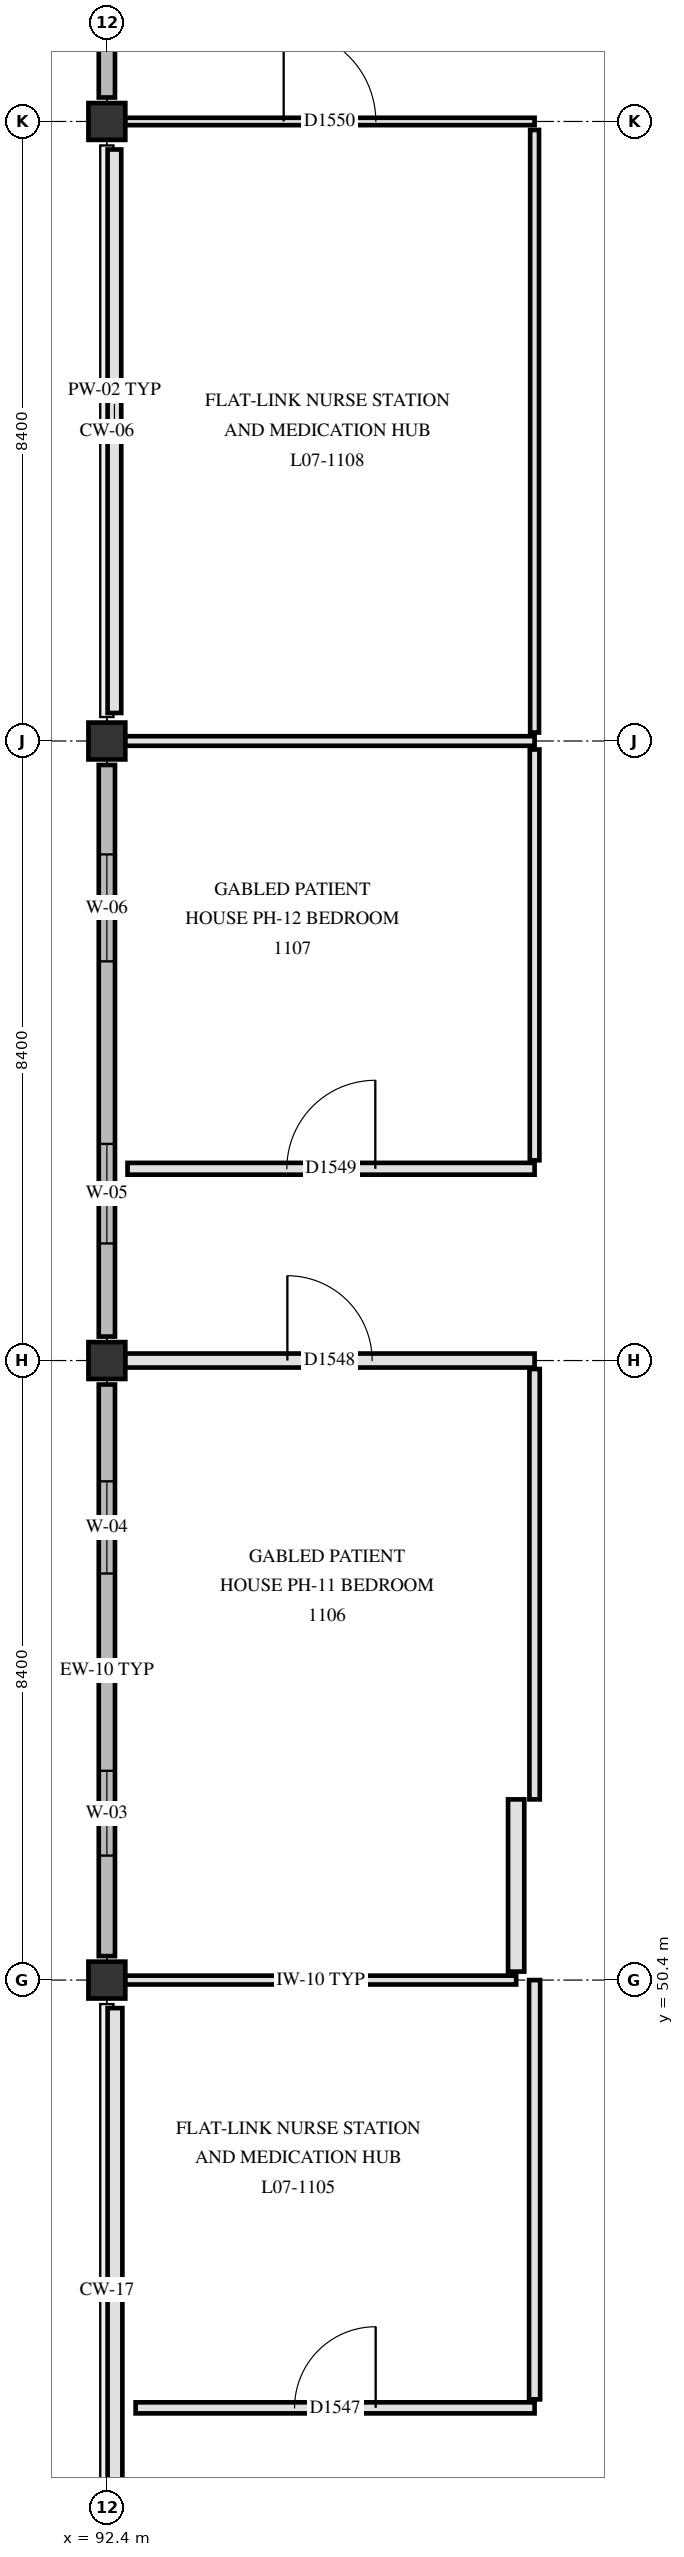
"""IFC4 building model, lengths in metres.
Left out: names, types, materials, properties, quantities, classifications, styles, units other than length and angle.
Written with IfcOpenShell. Run it as: python <this file> out.ifc"""

import sys

from ifc_helpers import new_model, si_unit, direction, frame, frame_2d, origin, origin_2d, place, context, subcontext, project, spatial, polyline, rectangle, outline, extrude, element, fill, save


model = new_model("IFC4")
c1 = context("Model", 3, precision=1e-05, world=origin(), true_north=direction((0.0, 1.0)))
c2 = subcontext(c1, "Body", "Model", "MODEL_VIEW")
j1 = project(units=[si_unit("LENGTHUNIT", "METRE"), si_unit("PLANEANGLEUNIT", "RADIAN")], contexts=[c1])
p1 = place(None, origin())
s1 = spatial("IfcSite", under=j1, at=p1, CompositionType="ELEMENT")
p2 = place(p1, origin())
s2 = spatial("IfcBuilding", under=s1, at=p2, CompositionType="ELEMENT")
p3 = place(p2, frame((0.0, 0.0, 30.3)))
s3 = spatial("IfcBuildingStorey", under=s2, at=p3, CompositionType="ELEMENT", Elevation=30.3)
for number, where, z_axis, x_axis in (
    (1, (92.4, 50.4, 0.0), (0.0, 0.0, 1.0), (1.0, 0.0, 0.0)),
    (2, (92.4, 58.8, 0.0), (0.0, 0.0, 1.0), (1.0, 0.0, 0.0)),
    (3, (92.4, 67.2, 0.0), (0.0, 0.0, 1.0), (1.0, 0.0, 0.0)),
    (4, (92.4, 75.6, 0.0), (0.0, 0.0, 1.0), (1.0, 0.0, 0.0)),
):
    element("IfcColumn", number, at=place(p3, frame(where, z_axis=z_axis, x_axis=x_axis)), inside=s3, PredefinedType="COLUMN", context=c2, shape_type="SweptSolid", body=[
        extrude(rectangle(XDim=0.5, YDim=0.5, at=origin_2d()), origin(), (0.0, 0.0, 1.0), 3.9),
    ])
p4 = place(p3, frame((92.4, 50.725, 0.0), z_axis=(0.0, 0.0, 1.0), x_axis=(0.0, 1.0, 0.0)))
e5 = element("IfcWall", 5, at=p4, inside=s3, PredefinedType="SOLIDWALL", context=c2, shape_type="SweptSolid", body=[
    extrude(outline(polyline([(0.0, 0.0), (7.75, 0.0), (7.75, 3.42), (3.875, 5.76), (0.0, 3.42), (0.0, 0.0)])), frame((0.0, 0.11, 0.0), z_axis=(0.0, -1.0, 0.0), x_axis=(1.0, 0.0, 0.0)), (0.0, 0.0, 1.0), 0.22),
])
p5 = place(p4, frame((1.363, 0.0, 0.85)))
e6 = element("IfcOpeningElement", 6, at=p5, cuts=e5, PredefinedType="OPENING", context=c2, shape_type="SweptSolid", body=[
    extrude(rectangle(XDim=1.15, YDim=1.3, at=frame_2d((0.575, 0.65))), frame((0.0, 0.12, 0.0), z_axis=(0.0, -1.0, 0.0), x_axis=(1.0, 0.0, 0.0)), (0.0, 0.0, 1.0), 0.24),
])
p6 = place(p4, frame((5.188, 0.0, 0.85)))
e7 = element("IfcOpeningElement", 7, at=p6, cuts=e5, PredefinedType="OPENING", context=c2, shape_type="SweptSolid", body=[
    extrude(rectangle(XDim=1.25, YDim=1.3, at=frame_2d((0.625, 0.65))), frame((0.0, 0.12, 0.0), z_axis=(0.0, -1.0, 0.0), x_axis=(1.0, 0.0, 0.0)), (0.0, 0.0, 1.0), 0.24),
])
p7 = place(p3, frame((92.4, 59.125, 0.0), z_axis=(0.0, 0.0, 1.0), x_axis=(0.0, 1.0, 0.0)))
e8 = element("IfcWall", 8, at=p7, inside=s3, PredefinedType="SOLIDWALL", context=c2, shape_type="SweptSolid", body=[
    extrude(outline(polyline([(0.0, 0.0), (7.75, 0.0), (7.75, 3.42), (3.875, 5.76), (0.0, 3.42), (0.0, 0.0)])), frame((0.0, 0.11, 0.0), z_axis=(0.0, -1.0, 0.0), x_axis=(1.0, 0.0, 0.0)), (0.0, 0.0, 1.0), 0.22),
])
p8 = place(p7, frame((1.262, 0.0, 0.85)))
e9 = element("IfcOpeningElement", 9, at=p8, cuts=e8, PredefinedType="OPENING", context=c2, shape_type="SweptSolid", body=[
    extrude(rectangle(XDim=1.35, YDim=1.3, at=frame_2d((0.675, 0.65))), frame((0.0, 0.12, 0.0), z_axis=(0.0, -1.0, 0.0), x_axis=(1.0, 0.0, 0.0)), (0.0, 0.0, 1.0), 0.24),
])
p9 = place(p7, frame((5.087, 0.0, 0.85)))
e10 = element("IfcOpeningElement", 10, at=p9, cuts=e8, PredefinedType="OPENING", context=c2, shape_type="SweptSolid", body=[
    extrude(rectangle(XDim=1.45, YDim=1.3, at=frame_2d((0.725, 0.65))), frame((0.0, 0.12, 0.0), z_axis=(0.0, -1.0, 0.0), x_axis=(1.0, 0.0, 0.0)), (0.0, 0.0, 1.0), 0.24),
])
p10 = place(p3, frame((92.4, 75.925, 0.0), z_axis=(0.0, 0.0, 1.0), x_axis=(0.0, 1.0, 0.0)))
e11 = element("IfcWall", 11, at=p10, inside=s3, PredefinedType="SOLIDWALL", context=c2, shape_type="SweptSolid", body=[
    extrude(outline(polyline([(0.0, 0.0), (7.75, 0.0), (7.75, 3.42), (3.875, 5.76), (0.0, 3.42), (0.0, 0.0)])), frame((0.0, 0.11, 0.0), z_axis=(0.0, -1.0, 0.0), x_axis=(1.0, 0.0, 0.0)), (0.0, 0.0, 1.0), 0.22),
])
p11 = place(p10, frame((1.163, 0.0, 0.85)))
e12 = element("IfcOpeningElement", 12, at=p11, cuts=e11, PredefinedType="OPENING", context=c2, shape_type="SweptSolid", body=[
    extrude(rectangle(XDim=1.55, YDim=1.3, at=frame_2d((0.775, 0.65))), frame((0.0, 0.12, 0.0), z_axis=(0.0, -1.0, 0.0), x_axis=(1.0, 0.0, 0.0)), (0.0, 0.0, 1.0), 0.24),
])
p12 = place(p10, frame((4.988, 0.0, 0.85)))
e13 = element("IfcOpeningElement", 13, at=p12, cuts=e11, PredefinedType="OPENING", context=c2, shape_type="SweptSolid", body=[
    extrude(rectangle(XDim=1.65, YDim=1.3, at=frame_2d((0.825, 0.65))), frame((0.0, 0.12, 0.0), z_axis=(0.0, -1.0, 0.0), x_axis=(1.0, 0.0, 0.0)), (0.0, 0.0, 1.0), 0.24),
])
p13 = place(p3, frame((92.502, 67.58, 3.88), z_axis=(0.0, 0.0, 1.0), x_axis=(0.0, 1.0, 0.0)))
e14 = element("IfcWall", 14, at=p13, inside=s3, PredefinedType="PARAPET", context=c2, shape_type="SweptSolid", body=[
    extrude(rectangle(XDim=7.64, YDim=0.185, at=frame_2d((3.82, 0.0))), origin(), (0.0, 0.0, 1.0), 0.47),
])
p14 = place(p3, frame((92.51, 42.38, 3.88), z_axis=(0.0, 0.0, 1.0), x_axis=(0.0, 1.0, 0.0)))
e15 = element("IfcWall", 15, at=p14, inside=s3, PredefinedType="PARAPET", context=c2, shape_type="SweptSolid", body=[
    extrude(rectangle(XDim=7.64, YDim=0.2, at=frame_2d((3.82, 0.0))), origin(), (0.0, 0.0, 1.0), 0.47),
])
p15 = place(p3, frame((92.79, 44.6, 0.0), z_axis=(0.0, 0.0, 1.0), x_axis=(1.0, 0.0, 0.0)))
e16 = element("IfcWall", 16, at=p15, inside=s3, PredefinedType="PARTITIONING", context=c2, shape_type="SweptSolid", body=[
    extrude(rectangle(XDim=5.41, YDim=0.15, at=frame_2d((2.705, 0.0))), origin(), (0.0, 0.0, 1.0), 3.65),
])
p16 = place(p15, frame((2.155, 0.0, 0.0)))
e17 = element("IfcOpeningElement", 17, at=p16, cuts=e16, PredefinedType="OPENING", context=c2, shape_type="SweptSolid", body=[
    extrude(rectangle(XDim=1.1, YDim=2.15, at=frame_2d((0.55, 1.075))), frame((0.0, 0.085, 0.0), z_axis=(0.0, -1.0, 0.0), x_axis=(1.0, 0.0, 0.0)), (0.0, 0.0, 1.0), 0.17),
])
p17 = place(p3, frame((92.645, 50.4, 0.0), z_axis=(0.0, 0.0, 1.0), x_axis=(1.0, 0.0, 0.0)))
e18 = element("IfcWall", 18, at=p17, inside=s3, PredefinedType="PARTITIONING", context=c2, shape_type="SweptSolid", body=[
    extrude(rectangle(XDim=5.305, YDim=0.12, at=frame_2d((2.652, 0.0))), origin(), (0.0, 0.0, 1.0), 3.25),
])
p18 = place(p3, frame((92.645, 58.8, 0.0), z_axis=(0.0, 0.0, 1.0), x_axis=(1.0, 0.0, 0.0)))
e19 = element("IfcWall", 19, at=p18, inside=s3, PredefinedType="PARTITIONING", context=c2, shape_type="SweptSolid", body=[
    extrude(rectangle(XDim=5.555, YDim=0.19, at=frame_2d((2.777, 0.0))), origin(), (0.0, 0.0, 1.0), 3.25),
])
p19 = place(p18, frame((2.202, 0.0, 0.0)))
e20 = element("IfcOpeningElement", 20, at=p19, cuts=e19, PredefinedType="OPENING", context=c2, shape_type="SweptSolid", body=[
    extrude(rectangle(XDim=1.15, YDim=2.15, at=frame_2d((0.575, 1.075))), frame((0.0, 0.105, 0.0), z_axis=(0.0, -1.0, 0.0), x_axis=(1.0, 0.0, 0.0)), (0.0, 0.0, 1.0), 0.21),
])
p20 = place(p3, frame((92.68, 61.4, 0.0), z_axis=(0.0, 0.0, 1.0), x_axis=(1.0, 0.0, 0.0)))
e21 = element("IfcWall", 21, at=p20, inside=s3, PredefinedType="PARTITIONING", context=c2, shape_type="SweptSolid", body=[
    extrude(rectangle(XDim=5.52, YDim=0.16, at=frame_2d((2.76, 0.0))), origin(), (0.0, 0.0, 1.0), 3.65),
])
p21 = place(p20, frame((2.16, 0.0, 0.0)))
e22 = element("IfcOpeningElement", 22, at=p21, cuts=e21, PredefinedType="OPENING", context=c2, shape_type="SweptSolid", body=[
    extrude(rectangle(XDim=1.2, YDim=2.15, at=frame_2d((0.6, 1.075))), frame((0.0, 0.09, 0.0), z_axis=(0.0, -1.0, 0.0), x_axis=(1.0, 0.0, 0.0)), (0.0, 0.0, 1.0), 0.18),
])
p22 = place(p3, frame((92.645, 67.2, 0.0), z_axis=(0.0, 0.0, 1.0), x_axis=(1.0, 0.0, 0.0)))
e23 = element("IfcWall", 23, at=p22, inside=s3, PredefinedType="PARTITIONING", context=c2, shape_type="SweptSolid", body=[
    extrude(rectangle(XDim=5.555, YDim=0.13, at=frame_2d((2.777, 0.0))), origin(), (0.0, 0.0, 1.0), 3.25),
])
p23 = place(p3, frame((92.645, 75.6, 0.0), z_axis=(0.0, 0.0, 1.0), x_axis=(1.0, 0.0, 0.0)))
e24 = element("IfcWall", 24, at=p23, inside=s3, PredefinedType="PARTITIONING", context=c2, shape_type="SweptSolid", body=[
    extrude(rectangle(XDim=5.555, YDim=0.1, at=frame_2d((2.777, 0.0))), origin(), (0.0, 0.0, 1.0), 3.25),
])
p24 = place(p23, frame((2.153, 0.0, 0.0)))
e25 = element("IfcOpeningElement", 25, at=p24, cuts=e24, PredefinedType="OPENING", context=c2, shape_type="SweptSolid", body=[
    extrude(rectangle(XDim=1.25, YDim=2.2, at=frame_2d((0.625, 1.1))), frame((0.0, 0.06, 0.0), z_axis=(0.0, -1.0, 0.0), x_axis=(1.0, 0.0, 0.0)), (0.0, 0.0, 1.0), 0.12),
])
p25 = place(p3, frame((97.95, 50.515, 0.0), z_axis=(0.0, 0.0, 1.0), x_axis=(0.0, 1.0, 0.0)))
e26 = element("IfcWall", 26, at=p25, inside=s3, PredefinedType="PARTITIONING", context=c2, shape_type="SweptSolid", body=[
    extrude(rectangle(XDim=2.335, YDim=0.22, at=frame_2d((1.167, 0.0))), origin(), (0.0, 0.0, 1.0), 3.65),
])
p26 = place(p3, frame((98.2, 44.715, 0.0), z_axis=(0.0, 0.0, 1.0), x_axis=(0.0, 1.0, 0.0)))
e27 = element("IfcWall", 27, at=p26, inside=s3, PredefinedType="PARTITIONING", context=c2, shape_type="SweptSolid", body=[
    extrude(rectangle(XDim=5.685, YDim=0.15, at=frame_2d((2.842, 0.0))), origin(), (0.0, 0.0, 1.0), 3.25),
])
p27 = place(p3, frame((98.2, 52.85, 0.0), z_axis=(0.0, 0.0, 1.0), x_axis=(0.0, 1.0, 0.0)))
e28 = element("IfcWall", 28, at=p27, inside=s3, PredefinedType="PARTITIONING", context=c2, shape_type="SweptSolid", body=[
    extrude(rectangle(XDim=5.835, YDim=0.14, at=frame_2d((2.917, 0.0))), origin(), (0.0, 0.0, 1.0), 3.41),
])
p28 = place(p3, frame((98.2, 61.515, 0.0), z_axis=(0.0, 0.0, 1.0), x_axis=(0.0, 1.0, 0.0)))
e29 = element("IfcWall", 29, at=p28, inside=s3, PredefinedType="PARTITIONING", context=c2, shape_type="SweptSolid", body=[
    extrude(rectangle(XDim=5.57, YDim=0.13, at=frame_2d((2.785, 0.0))), origin(), (0.0, 0.0, 1.0), 3.41),
])
p29 = place(p3, frame((98.2, 67.315, 0.0), z_axis=(0.0, 0.0, 1.0), x_axis=(0.0, 1.0, 0.0)))
e30 = element("IfcWall", 30, at=p29, inside=s3, PredefinedType="PARTITIONING", context=c2, shape_type="SweptSolid", body=[
    extrude(rectangle(XDim=8.17, YDim=0.12, at=frame_2d((4.085, 0.0))), origin(), (0.0, 0.0, 1.0), 3.41),
])
p30 = place(p5, origin())
e31 = element("IfcWindow", 31, at=p30, inside=s3, PartitioningType="SINGLE_PANEL", PredefinedType="WINDOW", context=c2, shape_type="SweptSolid", body=[
    extrude(rectangle(XDim=1.15, YDim=1.3, at=frame_2d((0.575, 0.65))), frame((0.0, 0.03, 0.0), z_axis=(0.0, -1.0, 0.0), x_axis=(1.0, 0.0, 0.0)), (0.0, 0.0, 1.0), 0.06),
])
fill(e6, e31)
p31 = place(p6, origin())
e32 = element("IfcWindow", 32, at=p31, inside=s3, PartitioningType="SINGLE_PANEL", PredefinedType="WINDOW", context=c2, shape_type="SweptSolid", body=[
    extrude(rectangle(XDim=1.25, YDim=1.3, at=frame_2d((0.625, 0.65))), frame((0.0, 0.03, 0.0), z_axis=(0.0, -1.0, 0.0), x_axis=(1.0, 0.0, 0.0)), (0.0, 0.0, 1.0), 0.06),
])
fill(e7, e32)
p32 = place(p8, origin())
e33 = element("IfcWindow", 33, at=p32, inside=s3, PartitioningType="SINGLE_PANEL", PredefinedType="WINDOW", context=c2, shape_type="SweptSolid", body=[
    extrude(rectangle(XDim=1.35, YDim=1.3, at=frame_2d((0.675, 0.65))), frame((0.0, 0.03, 0.0), z_axis=(0.0, -1.0, 0.0), x_axis=(1.0, 0.0, 0.0)), (0.0, 0.0, 1.0), 0.06),
])
fill(e9, e33)
p33 = place(p9, origin())
e34 = element("IfcWindow", 34, at=p33, inside=s3, PartitioningType="SINGLE_PANEL", PredefinedType="WINDOW", context=c2, shape_type="SweptSolid", body=[
    extrude(rectangle(XDim=1.45, YDim=1.3, at=frame_2d((0.725, 0.65))), frame((0.0, 0.03, 0.0), z_axis=(0.0, -1.0, 0.0), x_axis=(1.0, 0.0, 0.0)), (0.0, 0.0, 1.0), 0.06),
])
fill(e10, e34)
p34 = place(p16, origin())
e35 = element("IfcDoor", 35, at=p34, inside=s3, OperationType="SINGLE_SWING_RIGHT", PredefinedType="DOOR", context=c2, shape_type="SweptSolid", body=[
    extrude(rectangle(XDim=1.1, YDim=2.15, at=frame_2d((0.55, 1.075))), frame((0.0, 0.025, 0.0), z_axis=(0.0, -1.0, 0.0), x_axis=(1.0, 0.0, 0.0)), (0.0, 0.0, 1.0), 0.05),
])
fill(e17, e35)
p35 = place(p19, origin())
e36 = element("IfcDoor", 36, at=p35, inside=s3, OperationType="SINGLE_SWING_LEFT", PredefinedType="DOOR", context=c2, shape_type="SweptSolid", body=[
    extrude(rectangle(XDim=1.15, YDim=2.15, at=frame_2d((0.575, 1.075))), frame((0.0, 0.025, 0.0), z_axis=(0.0, -1.0, 0.0), x_axis=(1.0, 0.0, 0.0)), (0.0, 0.0, 1.0), 0.05),
])
fill(e20, e36)
p36 = place(p21, origin())
e37 = element("IfcDoor", 37, at=p36, inside=s3, OperationType="SINGLE_SWING_RIGHT", PredefinedType="DOOR", context=c2, shape_type="SweptSolid", body=[
    extrude(rectangle(XDim=1.2, YDim=2.15, at=frame_2d((0.6, 1.075))), frame((0.0, 0.025, 0.0), z_axis=(0.0, -1.0, 0.0), x_axis=(1.0, 0.0, 0.0)), (0.0, 0.0, 1.0), 0.05),
])
fill(e22, e37)
p37 = place(p24, origin())
e38 = element("IfcDoor", 38, at=p37, inside=s3, OperationType="SINGLE_SWING_LEFT", PredefinedType="DOOR", context=c2, shape_type="SweptSolid", body=[
    extrude(rectangle(XDim=1.25, YDim=2.2, at=frame_2d((0.625, 1.1))), frame((0.0, 0.025, 0.0), z_axis=(0.0, -1.0, 0.0), x_axis=(1.0, 0.0, 0.0)), (0.0, 0.0, 1.0), 0.05),
])
fill(e25, e38)
save(model, sys.argv[1])
